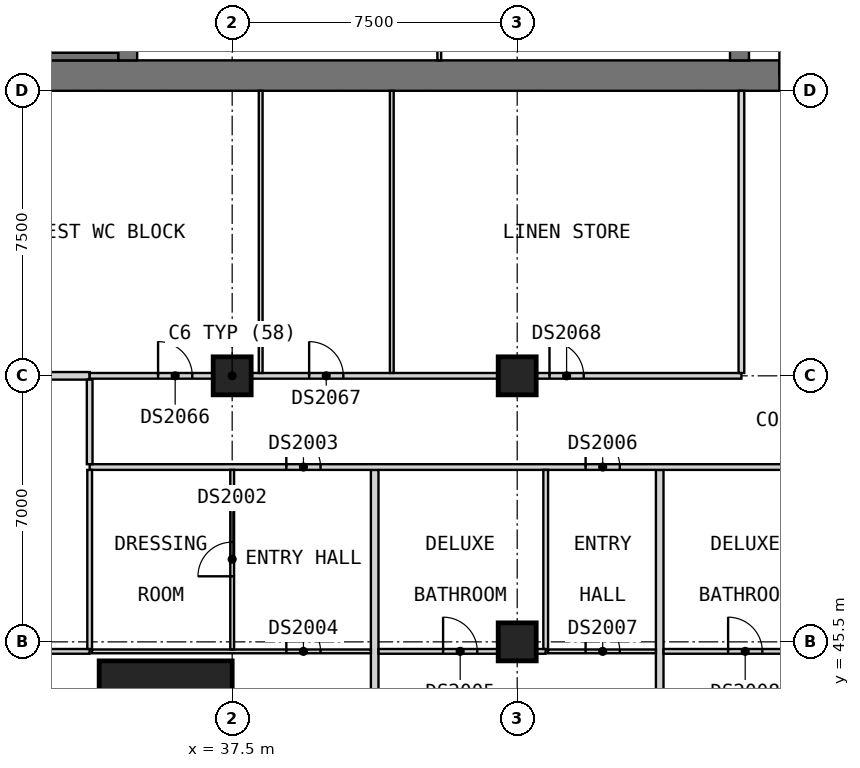
"""IFC4 building model, lengths in metres.
Left out: names, types, materials, properties, quantities, classifications, styles, units other than length and angle.
Written with IfcOpenShell. Run it as: python <this file> out.ifc"""

import sys

from ifc_helpers import new_model, si_unit, direction, frame, frame_2d, origin, origin_2d, place, context, subcontext, project, spatial, rectangle, extrude, element, fill, save


model = new_model("IFC4")
c1 = context("Model", 3, precision=1e-05, world=origin(), true_north=direction((0.0, 1.0)))
c2 = subcontext(c1, "Body", "Model", "MODEL_VIEW")
j1 = project(units=[si_unit("LENGTHUNIT", "METRE"), si_unit("PLANEANGLEUNIT", "RADIAN")], contexts=[c1])
p1 = place(None, origin())
s1 = spatial("IfcSite", under=j1, at=p1, CompositionType="ELEMENT")
p2 = place(p1, origin())
s2 = spatial("IfcBuilding", under=s1, at=p2, CompositionType="ELEMENT")
p3 = place(p2, frame((0.0, 0.0, 162.6)))
s3 = spatial("IfcBuildingStorey", under=s2, at=p3, CompositionType="ELEMENT", Elevation=162.6)
for number, where, z_axis, x_axis in (
    (1, (37.5, 52.5, 0.0), (0.0, 0.0, 1.0), (1.0, 0.0, 0.0)),
    (2, (45.0, 45.5, 0.0), (0.0, 0.0, 1.0), (1.0, 0.0, 0.0)),
    (3, (45.0, 52.5, 0.0), (0.0, 0.0, 1.0), (1.0, 0.0, 0.0)),
):
    element("IfcColumn", number, at=place(p3, frame(where, z_axis=z_axis, x_axis=x_axis)), inside=s3, PredefinedType="COLUMN", context=c2, shape_type="SweptSolid", body=[
        extrude(rectangle(XDim=1.0, YDim=1.0, at=origin_2d()), origin(), (0.0, 0.0, 1.0), 3.6),
    ])
p4 = place(p3, frame((35.75, 43.25, 0.0), z_axis=(0.0, 0.0, 1.0), x_axis=(1.0, 0.0, 0.0)))
e4 = element("IfcColumn", 4, at=p4, inside=s3, PredefinedType="COLUMN", context=c2, shape_type="SweptSolid", body=[
    extrude(rectangle(XDim=3.5, YDim=3.5, at=origin_2d()), origin(), (0.0, 0.0, 1.0), 3.6),
])
p5 = place(p3, frame((30.0, 60.4, 0.0), z_axis=(0.0, 0.0, 1.0), x_axis=(1.0, 0.0, 0.0)))
e5 = element("IfcWall", 5, at=p5, inside=s3, PredefinedType="SHEAR", context=c2, shape_type="SweptSolid", body=[
    extrude(rectangle(XDim=30.0, YDim=0.8, at=frame_2d((15.0, 0.0))), origin(), (0.0, 0.0, 1.0), 3.6),
])
p6 = place(p5, frame((21.9, 0.0, 0.0)))
e6 = element("IfcOpeningElement", 6, at=p6, cuts=e5, PredefinedType="OPENING", context=c2, shape_type="SweptSolid", body=[
    extrude(rectangle(XDim=1.8, YDim=2.1, at=frame_2d((0.9, 1.05))), frame((0.0, 0.41, 0.0), z_axis=(0.0, -1.0, 0.0), x_axis=(1.0, 0.0, 0.0)), (0.0, 0.0, 1.0), 0.82),
])
p7 = place(p5, frame((26.5, 0.0, 0.0)))
e7 = element("IfcOpeningElement", 7, at=p7, cuts=e5, PredefinedType="OPENING", context=c2, shape_type="SweptSolid", body=[
    extrude(rectangle(XDim=1.2, YDim=2.1, at=frame_2d((0.6, 1.05))), frame((0.0, 0.41, 0.0), z_axis=(0.0, -1.0, 0.0), x_axis=(1.0, 0.0, 0.0)), (0.0, 0.0, 1.0), 0.82),
])
for number, where, z_axis, x_axis in (
    (8, (34.75, 60.8, 0.0), (0.0, 0.0, 1.0), (0.0, 1.0, 0.0)),
    (9, (50.85, 60.8, 0.0), (0.0, 0.0, 1.0), (0.0, 1.0, 0.0)),
):
    element("IfcWall", number, at=place(p3, frame(where, z_axis=z_axis, x_axis=x_axis)), inside=s3, PredefinedType="SHEAR", context=c2, shape_type="SweptSolid", body=[
        extrude(rectangle(XDim=3.4, YDim=0.5, at=frame_2d((1.7, 0.0))), origin(), (0.0, 0.0, 1.0), 3.6),
    ])
p8 = place(p3, frame((42.95, 60.8, 0.0), z_axis=(0.0, 0.0, 1.0), x_axis=(0.0, 1.0, 0.0)))
e10 = element("IfcWall", 10, at=p8, inside=s3, PredefinedType="PARTITIONING", context=c2, shape_type="SweptSolid", body=[
    extrude(rectangle(XDim=3.2, YDim=0.1, at=frame_2d((1.6, 0.0))), origin(), (0.0, 0.0, 1.0), 3.19),
])
p9 = place(p3, frame((31.0, 60.9, 0.0), z_axis=(0.0, 0.0, 1.0), x_axis=(1.0, 0.0, 0.0)))
e11 = element("IfcWall", 11, at=p9, inside=s3, PredefinedType="SOLIDWALL", context=c2, shape_type="SweptSolid", body=[
    extrude(rectangle(XDim=3.5, YDim=0.2, at=frame_2d((1.75, 0.0))), origin(), (0.0, 0.0, 1.0), 3.19),
])
p10 = place(p3, frame((30.0, 52.5, 0.0), z_axis=(0.0, 0.0, 1.0), x_axis=(1.0, 0.0, 0.0)))
e12 = element("IfcWall", 12, at=p10, inside=s3, PredefinedType="PARTITIONING", context=c2, shape_type="SweptSolid", body=[
    extrude(rectangle(XDim=3.75, YDim=0.2, at=frame_2d((1.875, 0.0))), origin(), (0.0, 0.0, 1.0), 3.2),
])
for number, where, z_axis, x_axis in (
    (13, (41.25, 38.31, 0.0), (0.0, 0.0, 1.0), (0.0, 1.0, 0.0)),
    (14, (48.75, 38.31, 0.0), (0.0, 0.0, 1.0), (0.0, 1.0, 0.0)),
):
    element("IfcWall", number, at=place(p3, frame(where, z_axis=z_axis, x_axis=x_axis)), inside=s3, PredefinedType="PARTITIONING", context=c2, shape_type="SweptSolid", body=[
        extrude(rectangle(XDim=11.715, YDim=0.2, at=frame_2d((5.857, 0.0))), origin(), (0.0, 0.0, 1.0), 3.2),
    ])
p11 = place(p3, frame((33.75, 50.1, 0.0), z_axis=(0.0, 0.0, 1.0), x_axis=(1.0, 0.0, 0.0)))
e15 = element("IfcWall", 15, at=p11, inside=s3, PredefinedType="PARTITIONING", context=c2, shape_type="SweptSolid", body=[
    extrude(rectangle(XDim=39.9, YDim=0.15, at=frame_2d((19.95, 0.0))), origin(), (0.0, 0.0, 1.0), 3.2),
])
p12 = place(p11, frame((5.175, 0.0, 0.0)))
e16 = element("IfcOpeningElement", 16, at=p12, cuts=e15, PredefinedType="OPENING", context=c2, shape_type="SweptSolid", body=[
    extrude(rectangle(XDim=0.9, YDim=2.1, at=frame_2d((0.45, 1.05))), frame((0.0, 0.085, 0.0), z_axis=(0.0, -1.0, 0.0), x_axis=(1.0, 0.0, 0.0)), (0.0, 0.0, 1.0), 0.17),
])
p13 = place(p11, frame((13.05, 0.0, 0.0)))
e17 = element("IfcOpeningElement", 17, at=p13, cuts=e15, PredefinedType="OPENING", context=c2, shape_type="SweptSolid", body=[
    extrude(rectangle(XDim=0.9, YDim=2.1, at=frame_2d((0.45, 1.05))), frame((0.0, 0.085, 0.0), z_axis=(0.0, -1.0, 0.0), x_axis=(1.0, 0.0, 0.0)), (0.0, 0.0, 1.0), 0.17),
])
p14 = place(p11, frame((20.55, 0.0, 0.0)))
e18 = element("IfcOpeningElement", 18, at=p14, cuts=e15, PredefinedType="OPENING", context=c2, shape_type="SweptSolid", body=[
    extrude(rectangle(XDim=0.9, YDim=2.1, at=frame_2d((0.45, 1.05))), frame((0.0, 0.085, 0.0), z_axis=(0.0, -1.0, 0.0), x_axis=(1.0, 0.0, 0.0)), (0.0, 0.0, 1.0), 0.17),
])
p15 = place(p11, frame((24.3, 0.0, 0.0)))
e19 = element("IfcOpeningElement", 19, at=p15, cuts=e15, PredefinedType="OPENING", context=c2, shape_type="SweptSolid", body=[
    extrude(rectangle(XDim=0.9, YDim=2.1, at=frame_2d((0.45, 1.05))), frame((0.0, 0.085, 0.0), z_axis=(0.0, -1.0, 0.0), x_axis=(1.0, 0.0, 0.0)), (0.0, 0.0, 1.0), 0.17),
])
p16 = place(p11, frame((36.113, 0.0, 0.0)))
e20 = element("IfcOpeningElement", 20, at=p16, cuts=e15, PredefinedType="OPENING", context=c2, shape_type="SweptSolid", body=[
    extrude(rectangle(XDim=0.9, YDim=2.1, at=frame_2d((0.45, 1.05))), frame((0.0, 0.085, 0.0), z_axis=(0.0, -1.0, 0.0), x_axis=(1.0, 0.0, 0.0)), (0.0, 0.0, 1.0), 0.17),
])
p17 = place(p11, frame((38.25, 0.0, 0.0)))
e21 = element("IfcOpeningElement", 21, at=p17, cuts=e15, PredefinedType="OPENING", context=c2, shape_type="SweptSolid", body=[
    extrude(rectangle(XDim=0.9, YDim=2.1, at=frame_2d((0.45, 1.05))), frame((0.0, 0.085, 0.0), z_axis=(0.0, -1.0, 0.0), x_axis=(1.0, 0.0, 0.0)), (0.0, 0.0, 1.0), 0.17),
])
p18 = place(p3, frame((33.75, 52.5, 0.0), z_axis=(0.0, 0.0, 1.0), x_axis=(1.0, 0.0, 0.0)))
e22 = element("IfcWall", 22, at=p18, inside=s3, PredefinedType="PARTITIONING", context=c2, shape_type="SweptSolid", body=[
    extrude(rectangle(XDim=17.15, YDim=0.15, at=frame_2d((8.575, 0.0))), origin(), (0.0, 0.0, 1.0), 3.2),
])
p19 = place(p18, frame((1.8, 0.0, 0.0)))
e23 = element("IfcOpeningElement", 23, at=p19, cuts=e22, PredefinedType="OPENING", context=c2, shape_type="SweptSolid", body=[
    extrude(rectangle(XDim=0.9, YDim=2.1, at=frame_2d((0.45, 1.05))), frame((0.0, 0.085, 0.0), z_axis=(0.0, -1.0, 0.0), x_axis=(1.0, 0.0, 0.0)), (0.0, 0.0, 1.0), 0.17),
])
p20 = place(p18, frame((5.775, 0.0, 0.0)))
e24 = element("IfcOpeningElement", 24, at=p20, cuts=e22, PredefinedType="OPENING", context=c2, shape_type="SweptSolid", body=[
    extrude(rectangle(XDim=0.9, YDim=2.1, at=frame_2d((0.45, 1.05))), frame((0.0, 0.085, 0.0), z_axis=(0.0, -1.0, 0.0), x_axis=(1.0, 0.0, 0.0)), (0.0, 0.0, 1.0), 0.17),
])
p21 = place(p18, frame((12.1, 0.0, 0.0)))
e25 = element("IfcOpeningElement", 25, at=p21, cuts=e22, PredefinedType="OPENING", context=c2, shape_type="SweptSolid", body=[
    extrude(rectangle(XDim=0.9, YDim=2.1, at=frame_2d((0.45, 1.05))), frame((0.0, 0.085, 0.0), z_axis=(0.0, -1.0, 0.0), x_axis=(1.0, 0.0, 0.0)), (0.0, 0.0, 1.0), 0.17),
])
p22 = place(p3, frame((33.75, 50.175, 0.0), z_axis=(0.0, 0.0, 1.0), x_axis=(0.0, 1.0, 0.0)))
e26 = element("IfcWall", 26, at=p22, inside=s3, PredefinedType="PARTITIONING", context=c2, shape_type="SweptSolid", body=[
    extrude(rectangle(XDim=2.225, YDim=0.15, at=frame_2d((1.112, 0.0))), origin(), (0.0, 0.0, 1.0), 3.2),
])
p23 = place(p3, frame((33.812, 45.25, 0.0), z_axis=(0.0, 0.0, 1.0), x_axis=(1.0, 0.0, 0.0)))
e27 = element("IfcWall", 27, at=p23, inside=s3, PredefinedType="PARTITIONING", context=c2, shape_type="SweptSolid", body=[
    extrude(rectangle(XDim=7.337, YDim=0.1, at=frame_2d((3.669, 0.0))), origin(), (0.0, 0.0, 1.0), 3.2),
])
p24 = place(p23, frame((5.113, 0.0, 0.0)))
e28 = element("IfcOpeningElement", 28, at=p24, cuts=e27, PredefinedType="OPENING", context=c2, shape_type="SweptSolid", body=[
    extrude(rectangle(XDim=0.9, YDim=2.1, at=frame_2d((0.45, 1.05))), frame((0.0, 0.06, 0.0), z_axis=(0.0, -1.0, 0.0), x_axis=(1.0, 0.0, 0.0)), (0.0, 0.0, 1.0), 0.12),
])
p25 = place(p3, frame((45.812, 45.25, 0.0), z_axis=(0.0, 0.0, 1.0), x_axis=(1.0, 0.0, 0.0)))
e29 = element("IfcWall", 29, at=p25, inside=s3, PredefinedType="PARTITIONING", context=c2, shape_type="SweptSolid", body=[
    extrude(rectangle(XDim=2.837, YDim=0.1, at=frame_2d((1.419, 0.0))), origin(), (0.0, 0.0, 1.0), 3.2),
])
p26 = place(p25, frame((0.988, 0.0, 0.0)))
e30 = element("IfcOpeningElement", 30, at=p26, cuts=e29, PredefinedType="OPENING", context=c2, shape_type="SweptSolid", body=[
    extrude(rectangle(XDim=0.9, YDim=2.1, at=frame_2d((0.45, 1.05))), frame((0.0, 0.06, 0.0), z_axis=(0.0, -1.0, 0.0), x_axis=(1.0, 0.0, 0.0)), (0.0, 0.0, 1.0), 0.12),
])
p27 = place(p3, frame((37.5, 45.3, 0.0), z_axis=(0.0, 0.0, 1.0), x_axis=(0.0, 1.0, 0.0)))
e31 = element("IfcWall", 31, at=p27, inside=s3, PredefinedType="PARTITIONING", context=c2, shape_type="SweptSolid", body=[
    extrude(rectangle(XDim=4.725, YDim=0.1, at=frame_2d((2.362, 0.0))), origin(), (0.0, 0.0, 1.0), 3.2),
])
p28 = place(p27, frame((1.925, 0.0, 0.0)))
e32 = element("IfcOpeningElement", 32, at=p28, cuts=e31, PredefinedType="OPENING", context=c2, shape_type="SweptSolid", body=[
    extrude(rectangle(XDim=0.9, YDim=2.1, at=frame_2d((0.45, 1.05))), frame((0.0, 0.06, 0.0), z_axis=(0.0, -1.0, 0.0), x_axis=(1.0, 0.0, 0.0)), (0.0, 0.0, 1.0), 0.12),
])
for number, where, z_axis, x_axis in (
    (33, (38.25, 52.575, 0.0), (0.0, 0.0, 1.0), (0.0, 1.0, 0.0)),
    (34, (41.7, 52.575, 0.0), (0.0, 0.0, 1.0), (0.0, 1.0, 0.0)),
):
    element("IfcWall", number, at=place(p3, frame(where, z_axis=z_axis, x_axis=x_axis)), inside=s3, PredefinedType="PARTITIONING", context=c2, shape_type="SweptSolid", body=[
        extrude(rectangle(XDim=7.425, YDim=0.1, at=frame_2d((3.712, 0.0))), origin(), (0.0, 0.0, 1.0), 3.2),
    ])
p29 = place(p3, frame((30.0, 45.25, 0.0), z_axis=(0.0, 0.0, 1.0), x_axis=(1.0, 0.0, 0.0)))
e35 = element("IfcWall", 35, at=p29, inside=s3, PredefinedType="PARTITIONING", context=c2, shape_type="SweptSolid", body=[
    extrude(rectangle(XDim=3.75, YDim=0.125, at=frame_2d((1.875, 0.0))), origin(), (0.0, 0.0, 1.0), 2.85),
])
p30 = place(p29, frame((1.425, 0.0, 0.0)))
e36 = element("IfcOpeningElement", 36, at=p30, cuts=e35, PredefinedType="OPENING", context=c2, shape_type="SweptSolid", body=[
    extrude(rectangle(XDim=0.9, YDim=2.1, at=frame_2d((0.45, 1.05))), frame((0.0, 0.073, 0.0), z_axis=(0.0, -1.0, 0.0), x_axis=(1.0, 0.0, 0.0)), (0.0, 0.0, 1.0), 0.145),
])
p31 = place(p3, frame((41.35, 45.25, 0.0), z_axis=(0.0, 0.0, 1.0), x_axis=(1.0, 0.0, 0.0)))
e37 = element("IfcWall", 37, at=p31, inside=s3, PredefinedType="PARTITIONING", context=c2, shape_type="SweptSolid", body=[
    extrude(rectangle(XDim=4.4, YDim=0.125, at=frame_2d((2.2, 0.0))), origin(), (0.0, 0.0, 1.0), 3.2),
])
p32 = place(p31, frame((1.7, 0.0, 0.0)))
e38 = element("IfcOpeningElement", 38, at=p32, cuts=e37, PredefinedType="OPENING", context=c2, shape_type="SweptSolid", body=[
    extrude(rectangle(XDim=0.9, YDim=2.1, at=frame_2d((0.45, 1.05))), frame((0.0, 0.073, 0.0), z_axis=(0.0, -1.0, 0.0), x_axis=(1.0, 0.0, 0.0)), (0.0, 0.0, 1.0), 0.145),
])
p33 = place(p3, frame((48.85, 45.25, 0.0), z_axis=(0.0, 0.0, 1.0), x_axis=(1.0, 0.0, 0.0)))
e39 = element("IfcWall", 39, at=p33, inside=s3, PredefinedType="PARTITIONING", context=c2, shape_type="SweptSolid", body=[
    extrude(rectangle(XDim=4.4, YDim=0.125, at=frame_2d((2.2, 0.0))), origin(), (0.0, 0.0, 1.0), 3.2),
])
p34 = place(p33, frame((1.7, 0.0, 0.0)))
e40 = element("IfcOpeningElement", 40, at=p34, cuts=e39, PredefinedType="OPENING", context=c2, shape_type="SweptSolid", body=[
    extrude(rectangle(XDim=0.9, YDim=2.1, at=frame_2d((0.45, 1.05))), frame((0.0, 0.073, 0.0), z_axis=(0.0, -1.0, 0.0), x_axis=(1.0, 0.0, 0.0)), (0.0, 0.0, 1.0), 0.145),
])
for number, where, z_axis, x_axis in (
    (41, (33.75, 45.312, 0.0), (0.0, 0.0, 1.0), (0.0, 1.0, 0.0)),
    (42, (45.75, 45.312, 0.0), (0.0, 0.0, 1.0), (0.0, 1.0, 0.0)),
):
    element("IfcWall", number, at=place(p3, frame(where, z_axis=z_axis, x_axis=x_axis)), inside=s3, PredefinedType="PARTITIONING", context=c2, shape_type="SweptSolid", body=[
        extrude(rectangle(XDim=4.712, YDim=0.125, at=frame_2d((2.356, 0.0))), origin(), (0.0, 0.0, 1.0), 3.2),
    ])
p35 = place(p3, frame((50.9, 52.575, 0.0), z_axis=(0.0, 0.0, 1.0), x_axis=(0.0, 1.0, 0.0)))
e43 = element("IfcWall", 43, at=p35, inside=s3, PredefinedType="PARTITIONING", context=c2, shape_type="SweptSolid", body=[
    extrude(rectangle(XDim=7.425, YDim=0.15, at=frame_2d((3.712, 0.0))), origin(), (0.0, 0.0, 1.0), 3.2),
])
p36 = place(p6, origin())
e44 = element("IfcDoor", 44, at=p36, inside=s3, OperationType="DOUBLE_DOOR_SINGLE_SWING", PredefinedType="DOOR", context=c2, shape_type="SweptSolid", body=[
    extrude(rectangle(XDim=1.8, YDim=2.1, at=frame_2d((0.9, 1.05))), frame((0.0, 0.025, 0.0), z_axis=(0.0, -1.0, 0.0), x_axis=(1.0, 0.0, 0.0)), (0.0, 0.0, 1.0), 0.05),
])
fill(e6, e44)
p37 = place(p28, origin())
e45 = element("IfcDoor", 45, at=p37, inside=s3, OperationType="SINGLE_SWING_RIGHT", PredefinedType="DOOR", context=c2, shape_type="SweptSolid", body=[
    extrude(rectangle(XDim=0.9, YDim=2.1, at=frame_2d((0.45, 1.05))), frame((0.0, 0.025, 0.0), z_axis=(0.0, -1.0, 0.0), x_axis=(1.0, 0.0, 0.0)), (0.0, 0.0, 1.0), 0.05),
])
fill(e32, e45)
p38 = place(p12, origin())
e46 = element("IfcDoor", 46, at=p38, inside=s3, OperationType="SINGLE_SWING_RIGHT", PredefinedType="DOOR", context=c2, shape_type="SweptSolid", body=[
    extrude(rectangle(XDim=0.9, YDim=2.1, at=frame_2d((0.45, 1.05))), frame((0.0, 0.025, 0.0), z_axis=(0.0, -1.0, 0.0), x_axis=(1.0, 0.0, 0.0)), (0.0, 0.0, 1.0), 0.05),
])
fill(e16, e46)
p39 = place(p24, origin())
e47 = element("IfcDoor", 47, at=p39, inside=s3, OperationType="SINGLE_SWING_LEFT", PredefinedType="DOOR", context=c2, shape_type="SweptSolid", body=[
    extrude(rectangle(XDim=0.9, YDim=2.1, at=frame_2d((0.45, 1.05))), frame((0.0, 0.025, 0.0), z_axis=(0.0, -1.0, 0.0), x_axis=(1.0, 0.0, 0.0)), (0.0, 0.0, 1.0), 0.05),
])
fill(e28, e47)
p40 = place(p32, origin())
e48 = element("IfcDoor", 48, at=p40, inside=s3, OperationType="SINGLE_SWING_LEFT", PredefinedType="DOOR", context=c2, shape_type="SweptSolid", body=[
    extrude(rectangle(XDim=0.9, YDim=2.1, at=frame_2d((0.45, 1.05))), frame((0.0, 0.025, 0.0), z_axis=(0.0, -1.0, 0.0), x_axis=(1.0, 0.0, 0.0)), (0.0, 0.0, 1.0), 0.05),
])
fill(e38, e48)
p41 = place(p13, origin())
e49 = element("IfcDoor", 49, at=p41, inside=s3, OperationType="SINGLE_SWING_RIGHT", PredefinedType="DOOR", context=c2, shape_type="SweptSolid", body=[
    extrude(rectangle(XDim=0.9, YDim=2.1, at=frame_2d((0.45, 1.05))), frame((0.0, 0.025, 0.0), z_axis=(0.0, -1.0, 0.0), x_axis=(1.0, 0.0, 0.0)), (0.0, 0.0, 1.0), 0.05),
])
fill(e17, e49)
p42 = place(p26, origin())
e50 = element("IfcDoor", 50, at=p42, inside=s3, OperationType="SINGLE_SWING_LEFT", PredefinedType="DOOR", context=c2, shape_type="SweptSolid", body=[
    extrude(rectangle(XDim=0.9, YDim=2.1, at=frame_2d((0.45, 1.05))), frame((0.0, 0.025, 0.0), z_axis=(0.0, -1.0, 0.0), x_axis=(1.0, 0.0, 0.0)), (0.0, 0.0, 1.0), 0.05),
])
fill(e30, e50)
p43 = place(p34, origin())
e51 = element("IfcDoor", 51, at=p43, inside=s3, OperationType="SINGLE_SWING_LEFT", PredefinedType="DOOR", context=c2, shape_type="SweptSolid", body=[
    extrude(rectangle(XDim=0.9, YDim=2.1, at=frame_2d((0.45, 1.05))), frame((0.0, 0.025, 0.0), z_axis=(0.0, -1.0, 0.0), x_axis=(1.0, 0.0, 0.0)), (0.0, 0.0, 1.0), 0.05),
])
fill(e40, e51)
p44 = place(p19, origin())
e52 = element("IfcDoor", 52, at=p44, inside=s3, OperationType="SINGLE_SWING_LEFT", PredefinedType="DOOR", context=c2, shape_type="SweptSolid", body=[
    extrude(rectangle(XDim=0.9, YDim=2.1, at=frame_2d((0.45, 1.05))), frame((0.0, 0.025, 0.0), z_axis=(0.0, -1.0, 0.0), x_axis=(1.0, 0.0, 0.0)), (0.0, 0.0, 1.0), 0.05),
])
fill(e23, e52)
p45 = place(p20, origin())
e53 = element("IfcDoor", 53, at=p45, inside=s3, OperationType="SINGLE_SWING_LEFT", PredefinedType="DOOR", context=c2, shape_type="SweptSolid", body=[
    extrude(rectangle(XDim=0.9, YDim=2.1, at=frame_2d((0.45, 1.05))), frame((0.0, 0.025, 0.0), z_axis=(0.0, -1.0, 0.0), x_axis=(1.0, 0.0, 0.0)), (0.0, 0.0, 1.0), 0.05),
])
fill(e24, e53)
p46 = place(p21, origin())
e54 = element("IfcDoor", 54, at=p46, inside=s3, OperationType="SINGLE_SWING_LEFT", PredefinedType="DOOR", context=c2, shape_type="SweptSolid", body=[
    extrude(rectangle(XDim=0.9, YDim=2.1, at=frame_2d((0.45, 1.05))), frame((0.0, 0.025, 0.0), z_axis=(0.0, -1.0, 0.0), x_axis=(1.0, 0.0, 0.0)), (0.0, 0.0, 1.0), 0.05),
])
fill(e25, e54)
save(model, sys.argv[1])
